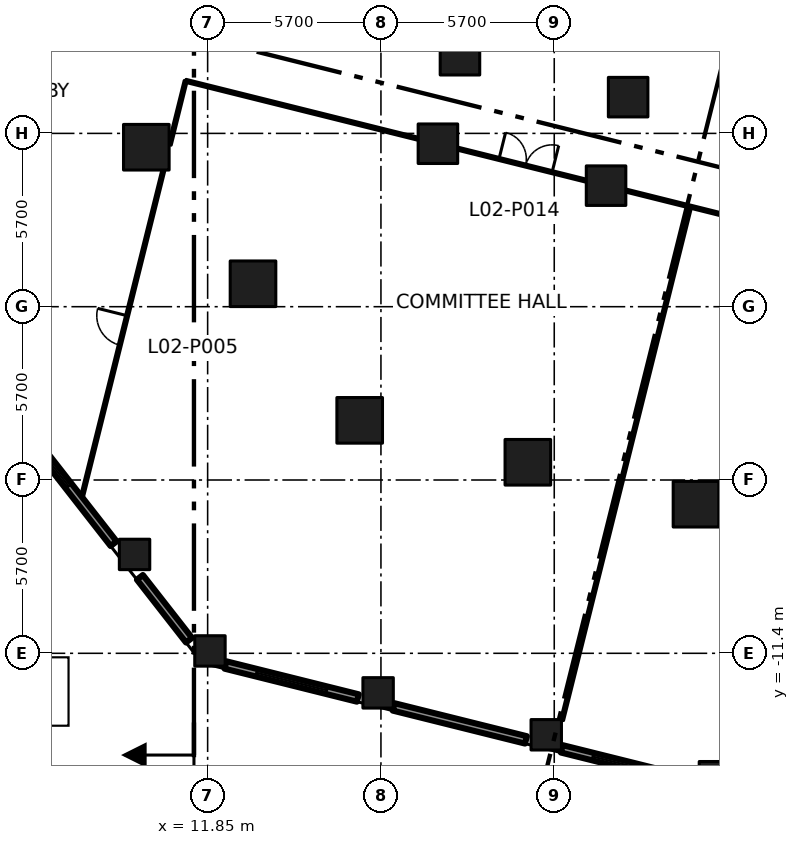
"""IFC4 building model, lengths in metres.
Left out: names, types, materials, properties, quantities, classifications, styles, units other than length and angle.
Written with IfcOpenShell. Run it as: python <this file> out.ifc"""

import sys

from ifc_helpers import new_model, si_unit, direction, frame, frame_2d, origin, origin_2d, place, context, subcontext, project, spatial, rectangle, extrude, element, fill, save


model = new_model("IFC4")
c1 = context("Model", 3, precision=1e-05, world=origin(), true_north=direction((0.0, 1.0)))
c2 = subcontext(c1, "Body", "Model", "MODEL_VIEW")
j1 = project(units=[si_unit("LENGTHUNIT", "METRE"), si_unit("PLANEANGLEUNIT", "RADIAN")], contexts=[c1])
p1 = place(None, origin())
s1 = spatial("IfcSite", under=j1, at=p1, CompositionType="ELEMENT")
p2 = place(p1, origin())
s2 = spatial("IfcBuilding", under=s1, at=p2, CompositionType="ELEMENT")
p3 = place(p2, frame((0.0, 0.0, 12.6)))
s3 = spatial("IfcBuildingStorey", under=s2, at=p3, CompositionType="ELEMENT", Elevation=12.6)
for number, where, z_axis, x_axis in (
    (1, (16.851, -3.738, 0.0), (0.0, 0.0, 1.0), (1.0, 0.0, 0.0)),
    (2, (13.342, 0.754, 0.0), (0.0, 0.0, 1.0), (1.0, 0.0, 0.0)),
    (3, (9.833, 5.245, 0.0), (0.0, 0.0, 1.0), (1.0, 0.0, 0.0)),
    (4, (22.382, -5.117, 0.0), (0.0, 0.0, 1.0), (1.0, 0.0, 0.0)),
    (5, (27.912, -6.496, 0.0), (0.0, 0.0, 1.0), (1.0, 0.0, 0.0)),
):
    element("IfcColumn", number, at=place(p3, frame(where, z_axis=z_axis, x_axis=x_axis)), inside=s3, PredefinedType="COLUMN", context=c2, shape_type="SweptSolid", body=[
        extrude(rectangle(XDim=1.5, YDim=1.5, at=origin_2d()), origin(), (0.0, 0.0, 1.0), 6.0),
    ])
for number, where, z_axis, x_axis in (
    (6, (19.424, 5.36, 0.0), (0.0, 0.0, 1.0), (1.0, 0.0, 0.0)),
    (7, (24.954, 3.981, 0.0), (0.0, 0.0, 1.0), (1.0, 0.0, 0.0)),
    (8, (20.149, 8.271, 0.0), (0.0, 0.0, 1.0), (1.0, 0.0, 0.0)),
    (9, (25.68, 6.892, 0.0), (0.0, 0.0, 1.0), (1.0, 0.0, 0.0)),
):
    element("IfcColumn", number, at=place(p3, frame(where, z_axis=z_axis, x_axis=x_axis)), inside=s3, PredefinedType="COLUMN", context=c2, shape_type="SweptSolid", body=[
        extrude(rectangle(XDim=1.3, YDim=1.3, at=origin_2d()), origin(), (0.0, 0.0, 1.0), 6.0),
    ])
for number, where, z_axis, x_axis in (
    (10, (9.446, -8.148, 0.0), (0.0, 0.0, 1.0), (1.0, 0.0, 0.0)),
    (11, (11.926, -11.322, 0.0), (0.0, 0.0, 1.0), (1.0, 0.0, 0.0)),
    (12, (17.457, -12.701, 0.0), (0.0, 0.0, 1.0), (1.0, 0.0, 0.0)),
    (13, (22.987, -14.08, 0.0), (0.0, 0.0, 1.0), (1.0, 0.0, 0.0)),
    (14, (28.518, -15.459, 0.0), (0.0, 0.0, 1.0), (1.0, 0.0, 0.0)),
):
    element("IfcColumn", number, at=place(p3, frame(where, z_axis=z_axis, x_axis=x_axis)), inside=s3, PredefinedType="COLUMN", context=c2, shape_type="SweptSolid", body=[
        extrude(rectangle(XDim=1.0, YDim=1.0, at=origin_2d()), origin(), (0.0, 0.0, 1.0), 6.0),
    ])
p4 = place(p3, frame((7.716, -6.257, 0.0), z_axis=(0.0, 0.0, 1.0), x_axis=(0.241891576484, 0.970303285177, 0.0)))
e15 = element("IfcWall", 15, at=p4, inside=s3, PredefinedType="PARTITIONING", context=c2, shape_type="SweptSolid", body=[
    extrude(rectangle(XDim=11.061, YDim=0.1, at=frame_2d((5.53, 0.0))), origin(), (0.0, 0.0, 1.0), 5.55),
])
p5 = place(p4, frame((5.144, 0.0, 0.0)))
e16 = element("IfcOpeningElement", 16, at=p5, cuts=e15, PredefinedType="OPENING", context=c2, shape_type="SweptSolid", body=[
    extrude(rectangle(XDim=1.0, YDim=2.1, at=frame_2d((0.5, 1.05))), frame((0.0, 0.06, 0.0), z_axis=(0.0, -1.0, 0.0), x_axis=(1.0, 0.0, 0.0)), (0.0, 0.0, 1.0), 0.12),
])
p6 = place(p3, frame((10.603, 5.323, 0.0), z_axis=(0.0, 0.0, 1.0), x_axis=(0.241847407238, 0.970314295273, 0.0)))
e17 = element("IfcWall", 17, at=p6, inside=s3, PredefinedType="PARTITIONING", context=c2, shape_type="SweptSolid", body=[
    extrude(rectangle(XDim=2.17, YDim=0.1, at=frame_2d((1.085, 0.0))), origin(), (0.0, 0.0, 1.0), 5.55),
])
p7 = place(p3, frame((11.128, 7.429, 0.0), z_axis=(0.0, 0.0, 1.0), x_axis=(0.970310377339, -0.241863125815, 0.0)))
e18 = element("IfcWall", 18, at=p7, inside=s3, PredefinedType="PARTITIONING", context=c2, shape_type="SweptSolid", body=[
    extrude(rectangle(XDim=7.859, YDim=0.1, at=frame_2d((3.93, 0.0))), origin(), (0.0, 0.0, 1.0), 5.55),
])
p8 = place(p3, frame((20.094, 5.193, 0.0), z_axis=(0.0, 0.0, 1.0), x_axis=(0.970321828551, -0.241817181023, 0.0)))
e19 = element("IfcWall", 19, at=p8, inside=s3, PredefinedType="PARTITIONING", context=c2, shape_type="SweptSolid", body=[
    extrude(rectangle(XDim=4.318, YDim=0.1, at=frame_2d((2.159, 0.0))), origin(), (0.0, 0.0, 1.0), 5.55),
])
p9 = place(p8, frame((1.38, 0.0, 0.0)))
e20 = element("IfcOpeningElement", 20, at=p9, cuts=e19, PredefinedType="OPENING", context=c2, shape_type="SweptSolid", body=[
    extrude(rectangle(XDim=1.8, YDim=2.1, at=frame_2d((0.9, 1.05))), frame((0.0, 0.06, 0.0), z_axis=(0.0, -1.0, 0.0), x_axis=(1.0, 0.0, 0.0)), (0.0, 0.0, 1.0), 0.12),
])
p10 = place(p3, frame((25.624, 3.815, 0.0), z_axis=(0.0, 0.0, 1.0), x_axis=(0.970295255208, -0.241923784941, 0.0)))
e21 = element("IfcWall", 21, at=p10, inside=s3, PredefinedType="PARTITIONING", context=c2, shape_type="SweptSolid", body=[
    extrude(rectangle(XDim=4.319, YDim=0.1, at=frame_2d((2.16, 0.0))), origin(), (0.0, 0.0, 1.0), 5.55),
])
p11 = place(p3, frame((23.507, -13.601, 0.0), z_axis=(0.0, 0.0, 1.0), x_axis=(0.24198959429, 0.970278844588, 0.0)))
e22 = element("IfcWall", 22, at=p11, inside=s3, PredefinedType="PARTITIONING", context=c2, shape_type="SweptSolid", body=[
    extrude(rectangle(XDim=17.36, YDim=0.1, at=frame_2d((8.68, 0.0))), origin(), (0.0, 0.0, 1.0), 5.55),
])
p12 = place(p3, frame((6.113, -4.409, 0.0), z_axis=(0.0, 0.0, 1.0), x_axis=(0.615603242749, -0.788056246417, 0.0)))
e23 = element("IfcWall", 23, at=p12, inside=s3, PredefinedType="SOLIDWALL", context=c2, shape_type="SweptSolid", body=[
    extrude(rectangle(XDim=4.297, YDim=0.25, at=frame_2d((2.148, 0.0))), origin(), (0.0, 0.0, 1.0), 4.65),
])
p13 = place(p12, frame((0.702, 0.0, 0.9)))
e24 = element("IfcOpeningElement", 24, at=p13, cuts=e23, PredefinedType="OPENING", context=c2, shape_type="SweptSolid", body=[
    extrude(rectangle(XDim=1.2, YDim=3.3, at=frame_2d((0.6, 1.65))), frame((0.0, 0.135, 0.0), z_axis=(0.0, -1.0, 0.0), x_axis=(1.0, 0.0, 0.0)), (0.0, 0.0, 1.0), 0.27),
])
p14 = place(p3, frame((9.622, -8.901, 0.0), z_axis=(0.0, 0.0, 1.0), x_axis=(0.615703609525, -0.787977832948, 0.0)))
e25 = element("IfcWall", 25, at=p14, inside=s3, PredefinedType="SOLIDWALL", context=c2, shape_type="SweptSolid", body=[
    extrude(rectangle(XDim=2.625, YDim=0.25, at=frame_2d((1.312, 0.0))), origin(), (0.0, 0.0, 1.0), 4.65),
])
p15 = place(p3, frame((12.436, -11.784, 0.0), z_axis=(0.0, 0.0, 1.0), x_axis=(0.970263990019, -0.242049147224, 0.0)))
e26 = element("IfcWall", 26, at=p15, inside=s3, PredefinedType="SOLIDWALL", context=c2, shape_type="SweptSolid", body=[
    extrude(rectangle(XDim=4.488, YDim=0.25, at=frame_2d((2.244, 0.0))), origin(), (0.0, 0.0, 1.0), 4.65),
])
p16 = place(p15, frame((1.044, 0.0, 0.9)))
e27 = element("IfcOpeningElement", 27, at=p16, cuts=e26, PredefinedType="OPENING", context=c2, shape_type="SweptSolid", body=[
    extrude(rectangle(XDim=2.4, YDim=3.3, at=frame_2d((1.2, 1.65))), frame((0.0, 0.135, 0.0), z_axis=(0.0, -1.0, 0.0), x_axis=(1.0, 0.0, 0.0)), (0.0, 0.0, 1.0), 0.27),
])
p17 = place(p3, frame((17.967, -13.163, 0.0), z_axis=(0.0, 0.0, 1.0), x_axis=(0.970315118421, -0.24184410467, 0.0)))
e28 = element("IfcWall", 28, at=p17, inside=s3, PredefinedType="SOLIDWALL", context=c2, shape_type="SweptSolid", body=[
    extrude(rectangle(XDim=4.486, YDim=0.25, at=frame_2d((2.243, 0.0))), origin(), (0.0, 0.0, 1.0), 4.65),
])
p18 = place(p3, frame((23.497, -14.542, 0.0), z_axis=(0.0, 0.0, 1.0), x_axis=(0.970327846266, -0.241793032904, 0.0)))
e29 = element("IfcWall", 29, at=p18, inside=s3, PredefinedType="SOLIDWALL", context=c2, shape_type="SweptSolid", body=[
    extrude(rectangle(XDim=4.487, YDim=0.25, at=frame_2d((2.244, 0.0))), origin(), (0.0, 0.0, 1.0), 4.65),
])
p19 = place(p18, frame((1.044, 0.0, 0.9)))
e30 = element("IfcOpeningElement", 30, at=p19, cuts=e29, PredefinedType="OPENING", context=c2, shape_type="SweptSolid", body=[
    extrude(rectangle(XDim=2.4, YDim=3.3, at=frame_2d((1.2, 1.65))), frame((0.0, 0.135, 0.0), z_axis=(0.0, -1.0, 0.0), x_axis=(1.0, 0.0, 0.0)), (0.0, 0.0, 1.0), 0.27),
])
p20 = place(p5, origin())
e31 = element("IfcDoor", 31, at=p20, inside=s3, OperationType="SINGLE_SWING_RIGHT", PredefinedType="DOOR", context=c2, shape_type="SweptSolid", body=[
    extrude(rectangle(XDim=1.0, YDim=2.1, at=frame_2d((0.5, 1.05))), frame((0.0, 0.025, 0.0), z_axis=(0.0, -1.0, 0.0), x_axis=(1.0, 0.0, 0.0)), (0.0, 0.0, 1.0), 0.05),
])
fill(e16, e31)
p21 = place(p9, origin())
e32 = element("IfcDoor", 32, at=p21, inside=s3, OperationType="DOUBLE_DOOR_SINGLE_SWING", PredefinedType="DOOR", context=c2, shape_type="SweptSolid", body=[
    extrude(rectangle(XDim=1.8, YDim=2.1, at=frame_2d((0.9, 1.05))), frame((0.0, 0.025, 0.0), z_axis=(0.0, -1.0, 0.0), x_axis=(1.0, 0.0, 0.0)), (0.0, 0.0, 1.0), 0.05),
])
fill(e20, e32)
p22 = place(p13, origin())
e33 = element("IfcWindow", 33, at=p22, inside=s3, PartitioningType="SINGLE_PANEL", PredefinedType="WINDOW", context=c2, shape_type="SweptSolid", body=[
    extrude(rectangle(XDim=1.2, YDim=3.3, at=frame_2d((0.6, 1.65))), frame((0.0, 0.03, 0.0), z_axis=(0.0, -1.0, 0.0), x_axis=(1.0, 0.0, 0.0)), (0.0, 0.0, 1.0), 0.06),
])
fill(e24, e33)
p23 = place(p16, origin())
e34 = element("IfcWindow", 34, at=p23, inside=s3, PartitioningType="DOUBLE_PANEL_VERTICAL", PredefinedType="WINDOW", context=c2, shape_type="SweptSolid", body=[
    extrude(rectangle(XDim=2.4, YDim=3.3, at=frame_2d((1.2, 1.65))), frame((0.0, 0.03, 0.0), z_axis=(0.0, -1.0, 0.0), x_axis=(1.0, 0.0, 0.0)), (0.0, 0.0, 1.0), 0.06),
])
fill(e27, e34)
p24 = place(p19, origin())
e35 = element("IfcWindow", 35, at=p24, inside=s3, PartitioningType="DOUBLE_PANEL_VERTICAL", PredefinedType="WINDOW", context=c2, shape_type="SweptSolid", body=[
    extrude(rectangle(XDim=2.4, YDim=3.3, at=frame_2d((1.2, 1.65))), frame((0.0, 0.03, 0.0), z_axis=(0.0, -1.0, 0.0), x_axis=(1.0, 0.0, 0.0)), (0.0, 0.0, 1.0), 0.06),
])
fill(e30, e35)
save(model, sys.argv[1])
